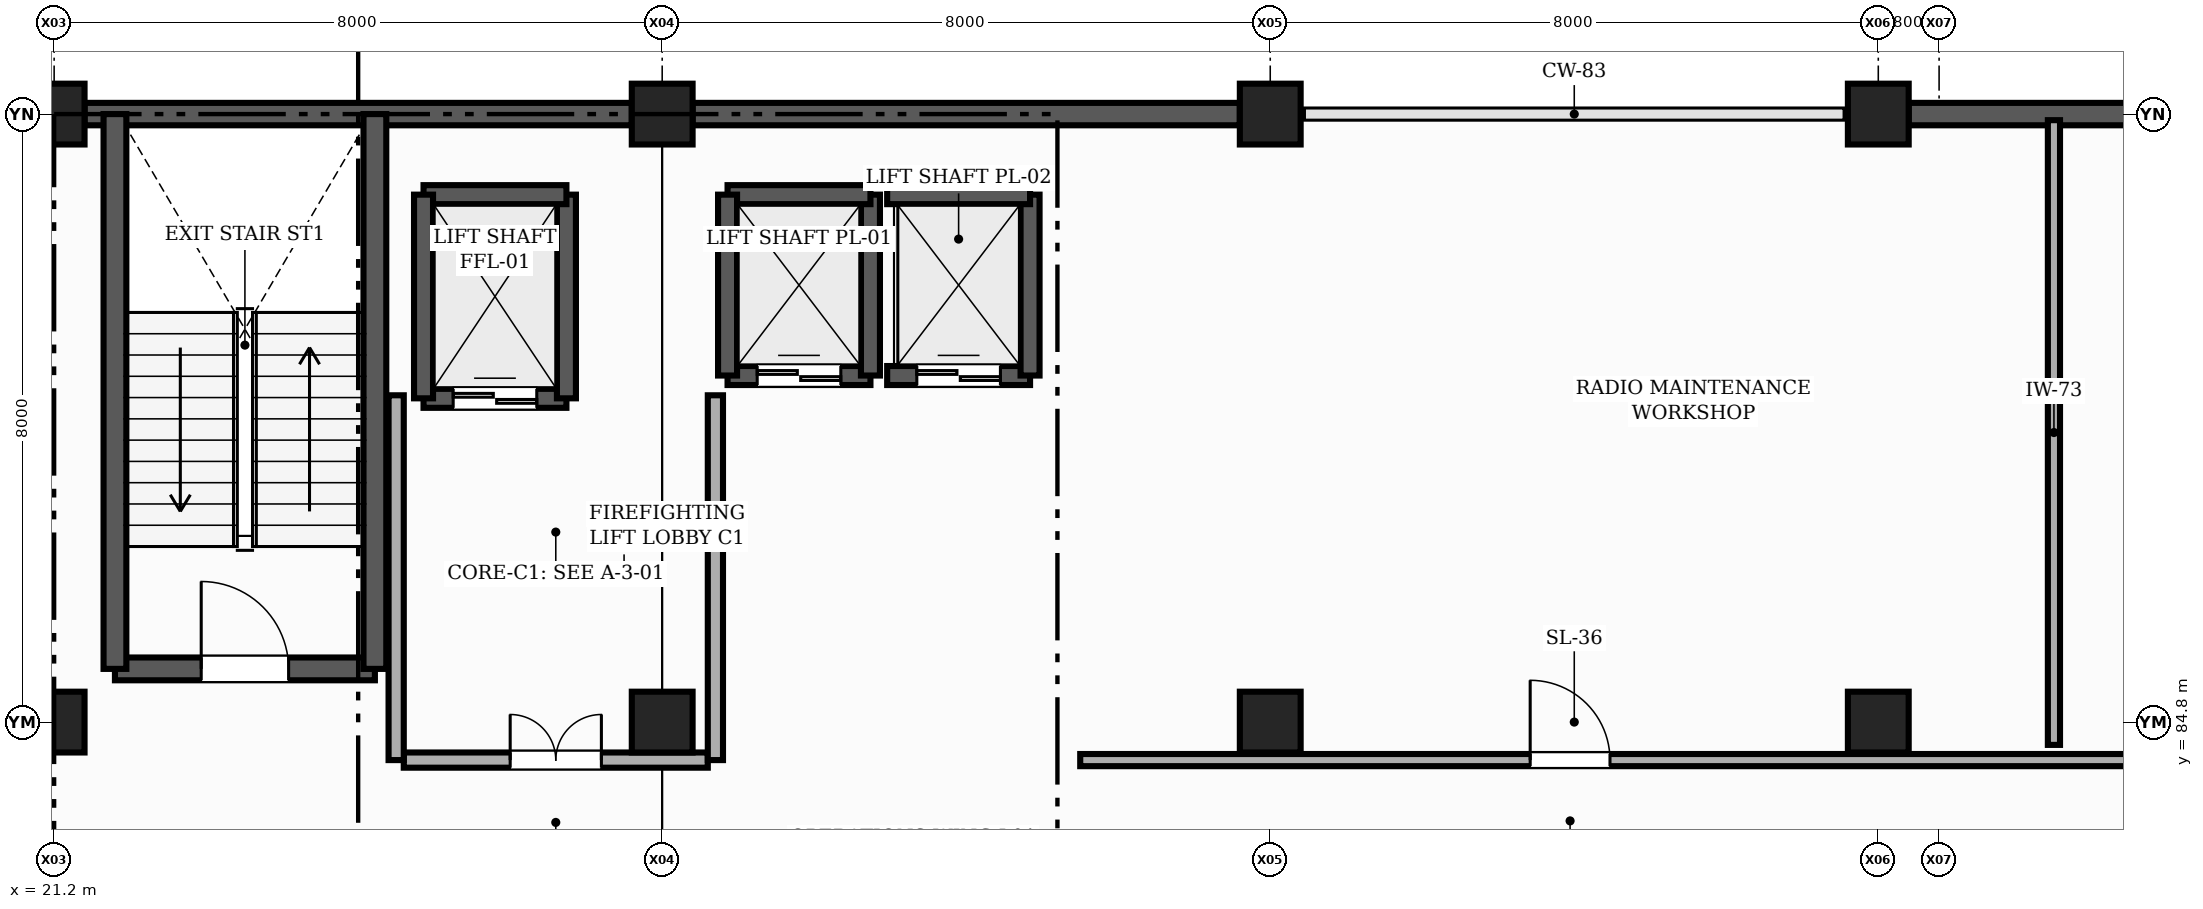
"""IFC4 building model, lengths in metres.
Left out: names, types, materials, properties, quantities, classifications, styles, units other than length and angle.
Written with IfcOpenShell. Run it as: python <this file> out.ifc"""

import sys

from ifc_helpers import new_model, si_unit, direction, frame, frame_2d, origin, origin_2d, place, context, subcontext, project, spatial, rectangle, extrude, element, fill, save


model = new_model("IFC4")
c1 = context("Model", 3, precision=1e-05, world=origin(), true_north=direction((0.0, 1.0)))
c2 = subcontext(c1, "Body", "Model", "MODEL_VIEW")
j1 = project(units=[si_unit("LENGTHUNIT", "METRE"), si_unit("PLANEANGLEUNIT", "RADIAN")], contexts=[c1])
p1 = place(None, origin())
s1 = spatial("IfcSite", under=j1, at=p1, CompositionType="ELEMENT")
p2 = place(p1, origin())
s2 = spatial("IfcBuilding", under=s1, at=p2, CompositionType="ELEMENT")
p3 = place(p2, frame((0.0, 0.0, 4.8)))
s3 = spatial("IfcBuildingStorey", under=s2, at=p3, CompositionType="ELEMENT", Elevation=4.8)
for number, where, z_axis, x_axis in (
    (1, (21.2, 84.8, 0.0), (0.0, 0.0, 1.0), (1.0, 0.0, 0.0)),
    (2, (21.2, 92.8, 0.0), (0.0, 0.0, 1.0), (1.0, 0.0, 0.0)),
    (3, (29.2, 84.8, 0.0), (0.0, 0.0, 1.0), (1.0, 0.0, 0.0)),
    (4, (29.2, 92.8, 0.0), (0.0, 0.0, 1.0), (1.0, 0.0, 0.0)),
    (5, (37.2, 84.8, 0.0), (0.0, 0.0, 1.0), (1.0, 0.0, 0.0)),
    (6, (37.2, 92.8, 0.0), (0.0, 0.0, 1.0), (1.0, 0.0, 0.0)),
    (7, (45.2, 84.8, 0.0), (0.0, 0.0, 1.0), (1.0, 0.0, 0.0)),
    (8, (45.2, 92.8, 0.0), (0.0, 0.0, 1.0), (1.0, 0.0, 0.0)),
):
    element("IfcColumn", number, at=place(p3, frame(where, z_axis=z_axis, x_axis=x_axis)), inside=s3, PredefinedType="COLUMN", context=c2, shape_type="SweptSolid", body=[
        extrude(rectangle(XDim=0.8, YDim=0.8, at=origin_2d()), origin(), (0.0, 0.0, 1.0), 4.2),
    ])
p4 = place(p3, frame((53.6, 92.8, 0.0), z_axis=(0.0, 0.0, 1.0), x_axis=(-1.0, 0.0, 0.0)))
e9 = element("IfcWall", 9, at=p4, inside=s3, PredefinedType="SOLIDWALL", context=c2, shape_type="SweptSolid", body=[
    extrude(rectangle(XDim=8.0, YDim=0.295, at=frame_2d((4.0, 0.0))), origin(), (0.0, 0.0, 1.0), 3.16),
])
p5 = place(p4, frame((3.3, 0.0, 0.9)))
e10 = element("IfcOpeningElement", 10, at=p5, cuts=e9, PredefinedType="OPENING", context=c2, shape_type="SweptSolid", body=[
    extrude(rectangle(XDim=1.4, YDim=1.4, at=frame_2d((0.7, 0.7))), frame((0.0, 0.157, 0.0), z_axis=(0.0, -1.0, 0.0), x_axis=(1.0, 0.0, 0.0)), (0.0, 0.0, 1.0), 0.315),
])
p6 = place(p3, frame((36.8, 92.8, 0.0), z_axis=(0.0, 0.0, 1.0), x_axis=(-1.0, 0.0, 0.0)))
e11 = element("IfcWall", 11, at=p6, inside=s3, PredefinedType="SOLIDWALL", context=c2, shape_type="SweptSolid", body=[
    extrude(rectangle(XDim=7.2, YDim=0.295, at=frame_2d((3.6, 0.0))), origin(), (0.0, 0.0, 1.0), 3.16),
])
p7 = place(p3, frame((28.8, 92.8, 0.0), z_axis=(0.0, 0.0, 1.0), x_axis=(-1.0, 0.0, 0.0)))
e12 = element("IfcWall", 12, at=p7, inside=s3, PredefinedType="SOLIDWALL", context=c2, shape_type="SweptSolid", body=[
    extrude(rectangle(XDim=7.2, YDim=0.295, at=frame_2d((3.6, 0.0))), origin(), (0.0, 0.0, 1.0), 3.91),
])
p8 = place(p3, frame((22.0, 85.5, 0.0), z_axis=(0.0, 0.0, 1.0), x_axis=(1.0, 0.0, 0.0)))
e13 = element("IfcWall", 13, at=p8, inside=s3, PredefinedType="SHEAR", context=c2, shape_type="SweptSolid", body=[
    extrude(rectangle(XDim=3.42, YDim=0.3, at=frame_2d((1.71, 0.0))), origin(), (0.0, 0.0, 1.0), 4.2),
])
p9 = place(p8, frame((1.135, 0.0, 0.0)))
e14 = element("IfcOpeningElement", 14, at=p9, cuts=e13, PredefinedType="OPENING", context=c2, shape_type="SweptSolid", body=[
    extrude(rectangle(XDim=1.15, YDim=2.15, at=frame_2d((0.575, 1.075))), frame((0.0, 0.16, 0.0), z_axis=(0.0, -1.0, 0.0), x_axis=(1.0, 0.0, 0.0)), (0.0, 0.0, 1.0), 0.32),
])
for number, where, z_axis, x_axis in (
    (15, (25.42, 85.5, 0.0), (0.0, 0.0, 1.0), (0.0, 1.0, 0.0)),
    (16, (22.0, 92.8, 0.0), (0.0, 0.0, 1.0), (0.0, -1.0, 0.0)),
):
    element("IfcWall", number, at=place(p3, frame(where, z_axis=z_axis, x_axis=x_axis)), inside=s3, PredefinedType="SHEAR", context=c2, shape_type="SweptSolid", body=[
        extrude(rectangle(XDim=7.3, YDim=0.3, at=frame_2d((3.65, 0.0))), origin(), (0.0, 0.0, 1.0), 4.2),
    ])
p10 = place(p3, frame((26.06, 89.06, 0.0), z_axis=(0.0, 0.0, 1.0), x_axis=(1.0, 0.0, 0.0)))
e17 = element("IfcWall", 17, at=p10, inside=s3, PredefinedType="SHEAR", context=c2, shape_type="SweptSolid", body=[
    extrude(rectangle(XDim=1.88, YDim=0.25, at=frame_2d((0.94, 0.0))), origin(), (0.0, 0.0, 1.0), 4.2),
])
p11 = place(p10, frame((0.39, 0.0, 0.0)))
e18 = element("IfcOpeningElement", 18, at=p11, cuts=e17, PredefinedType="OPENING", context=c2, shape_type="SweptSolid", body=[
    extrude(rectangle(XDim=1.1, YDim=2.2, at=frame_2d((0.55, 1.1))), frame((0.0, 0.135, 0.0), z_axis=(0.0, -1.0, 0.0), x_axis=(1.0, 0.0, 0.0)), (0.0, 0.0, 1.0), 0.27),
])
p12 = place(p3, frame((27.94, 89.06, 0.0), z_axis=(0.0, 0.0, 1.0), x_axis=(0.0, 1.0, 0.0)))
e19 = element("IfcWall", 19, at=p12, inside=s3, PredefinedType="SHEAR", context=c2, shape_type="SweptSolid", body=[
    extrude(rectangle(XDim=2.68, YDim=0.25, at=frame_2d((1.34, 0.0))), origin(), (0.0, 0.0, 1.0), 4.2),
])
p13 = place(p3, frame((27.94, 91.74, 0.0), z_axis=(0.0, 0.0, 1.0), x_axis=(-1.0, 0.0, 0.0)))
e20 = element("IfcWall", 20, at=p13, inside=s3, PredefinedType="SHEAR", context=c2, shape_type="SweptSolid", body=[
    extrude(rectangle(XDim=1.88, YDim=0.25, at=frame_2d((0.94, 0.0))), origin(), (0.0, 0.0, 1.0), 4.2),
])
p14 = place(p3, frame((26.06, 91.74, 0.0), z_axis=(0.0, 0.0, 1.0), x_axis=(0.0, -1.0, 0.0)))
e21 = element("IfcWall", 21, at=p14, inside=s3, PredefinedType="SHEAR", context=c2, shape_type="SweptSolid", body=[
    extrude(rectangle(XDim=2.68, YDim=0.25, at=frame_2d((1.34, 0.0))), origin(), (0.0, 0.0, 1.0), 4.2),
])
p15 = place(p3, frame((30.06, 89.36, 0.0), z_axis=(0.0, 0.0, 1.0), x_axis=(1.0, 0.0, 0.0)))
e22 = element("IfcWall", 22, at=p15, inside=s3, PredefinedType="SHEAR", context=c2, shape_type="SweptSolid", body=[
    extrude(rectangle(XDim=1.88, YDim=0.25, at=frame_2d((0.94, 0.0))), origin(), (0.0, 0.0, 1.0), 4.2),
])
p16 = place(p15, frame((0.39, 0.0, 0.0)))
e23 = element("IfcOpeningElement", 23, at=p16, cuts=e22, PredefinedType="OPENING", context=c2, shape_type="SweptSolid", body=[
    extrude(rectangle(XDim=1.1, YDim=2.2, at=frame_2d((0.55, 1.1))), frame((0.0, 0.135, 0.0), z_axis=(0.0, -1.0, 0.0), x_axis=(1.0, 0.0, 0.0)), (0.0, 0.0, 1.0), 0.27),
])
p17 = place(p3, frame((31.94, 89.36, 0.0), z_axis=(0.0, 0.0, 1.0), x_axis=(0.0, 1.0, 0.0)))
e24 = element("IfcWall", 24, at=p17, inside=s3, PredefinedType="SHEAR", context=c2, shape_type="SweptSolid", body=[
    extrude(rectangle(XDim=2.38, YDim=0.25, at=frame_2d((1.19, 0.0))), origin(), (0.0, 0.0, 1.0), 4.2),
])
p18 = place(p3, frame((31.94, 91.74, 0.0), z_axis=(0.0, 0.0, 1.0), x_axis=(-1.0, 0.0, 0.0)))
e25 = element("IfcWall", 25, at=p18, inside=s3, PredefinedType="SHEAR", context=c2, shape_type="SweptSolid", body=[
    extrude(rectangle(XDim=1.88, YDim=0.25, at=frame_2d((0.94, 0.0))), origin(), (0.0, 0.0, 1.0), 4.2),
])
p19 = place(p3, frame((30.06, 91.74, 0.0), z_axis=(0.0, 0.0, 1.0), x_axis=(0.0, -1.0, 0.0)))
e26 = element("IfcWall", 26, at=p19, inside=s3, PredefinedType="SHEAR", context=c2, shape_type="SweptSolid", body=[
    extrude(rectangle(XDim=2.38, YDim=0.25, at=frame_2d((1.19, 0.0))), origin(), (0.0, 0.0, 1.0), 4.2),
])
p20 = place(p3, frame((32.16, 89.36, 0.0), z_axis=(0.0, 0.0, 1.0), x_axis=(1.0, 0.0, 0.0)))
e27 = element("IfcWall", 27, at=p20, inside=s3, PredefinedType="SHEAR", context=c2, shape_type="SweptSolid", body=[
    extrude(rectangle(XDim=1.88, YDim=0.25, at=frame_2d((0.94, 0.0))), origin(), (0.0, 0.0, 1.0), 4.2),
])
p21 = place(p20, frame((0.39, 0.0, 0.0)))
e28 = element("IfcOpeningElement", 28, at=p21, cuts=e27, PredefinedType="OPENING", context=c2, shape_type="SweptSolid", body=[
    extrude(rectangle(XDim=1.1, YDim=2.2, at=frame_2d((0.55, 1.1))), frame((0.0, 0.135, 0.0), z_axis=(0.0, -1.0, 0.0), x_axis=(1.0, 0.0, 0.0)), (0.0, 0.0, 1.0), 0.27),
])
p22 = place(p3, frame((34.04, 89.36, 0.0), z_axis=(0.0, 0.0, 1.0), x_axis=(0.0, 1.0, 0.0)))
e29 = element("IfcWall", 29, at=p22, inside=s3, PredefinedType="SHEAR", context=c2, shape_type="SweptSolid", body=[
    extrude(rectangle(XDim=2.38, YDim=0.25, at=frame_2d((1.19, 0.0))), origin(), (0.0, 0.0, 1.0), 4.2),
])
p23 = place(p3, frame((34.04, 91.74, 0.0), z_axis=(0.0, 0.0, 1.0), x_axis=(-1.0, 0.0, 0.0)))
e30 = element("IfcWall", 30, at=p23, inside=s3, PredefinedType="SHEAR", context=c2, shape_type="SweptSolid", body=[
    extrude(rectangle(XDim=1.88, YDim=0.25, at=frame_2d((0.94, 0.0))), origin(), (0.0, 0.0, 1.0), 4.2),
])
p24 = place(p3, frame((25.8, 84.3, 0.0), z_axis=(0.0, 0.0, 1.0), x_axis=(1.0, 0.0, 0.0)))
e31 = element("IfcWall", 31, at=p24, inside=s3, PredefinedType="PARTITIONING", context=c2, shape_type="SweptSolid", body=[
    extrude(rectangle(XDim=4.0, YDim=0.2, at=frame_2d((2.0, 0.0))), origin(), (0.0, 0.0, 1.0), 3.195),
])
p25 = place(p24, frame((1.4, 0.0, 0.0)))
e32 = element("IfcOpeningElement", 32, at=p25, cuts=e31, PredefinedType="OPENING", context=c2, shape_type="SweptSolid", body=[
    extrude(rectangle(XDim=1.2, YDim=2.15, at=frame_2d((0.6, 1.075))), frame((0.0, 0.11, 0.0), z_axis=(0.0, -1.0, 0.0), x_axis=(1.0, 0.0, 0.0)), (0.0, 0.0, 1.0), 0.22),
])
p26 = place(p3, frame((25.7, 84.3, 0.0), z_axis=(0.0, 0.0, 1.0), x_axis=(0.0, 1.0, 0.0)))
e33 = element("IfcWall", 33, at=p26, inside=s3, PredefinedType="PARTITIONING", context=c2, shape_type="SweptSolid", body=[
    extrude(rectangle(XDim=4.8, YDim=0.2, at=frame_2d((2.4, 0.0))), origin(), (0.0, 0.0, 1.0), 3.345),
])
p27 = place(p3, frame((29.9, 84.3, 0.0), z_axis=(0.0, 0.0, 1.0), x_axis=(0.0, 1.0, 0.0)))
e34 = element("IfcWall", 34, at=p27, inside=s3, PredefinedType="PARTITIONING", context=c2, shape_type="SweptSolid", body=[
    extrude(rectangle(XDim=4.8, YDim=0.2, at=frame_2d((2.4, 0.0))), origin(), (0.0, 0.0, 1.0), 3.045),
])
p28 = place(p3, frame((47.511, 84.5, 0.0), z_axis=(0.0, 0.0, 1.0), x_axis=(0.0, 1.0, 0.0)))
e35 = element("IfcWall", 35, at=p28, inside=s3, PredefinedType="PARTITIONING", context=c2, shape_type="SweptSolid", body=[
    extrude(rectangle(XDim=8.22, YDim=0.16, at=frame_2d((4.11, 0.0))), origin(), (0.0, 0.0, 1.0), 3.145),
])
p29 = place(p3, frame((34.7, 84.3, 0.0), z_axis=(0.0, 0.0, 1.0), x_axis=(1.0, 0.0, 0.0)))
e36 = element("IfcWall", 36, at=p29, inside=s3, PredefinedType="PARTITIONING", context=c2, shape_type="SweptSolid", body=[
    extrude(rectangle(XDim=35.4, YDim=0.16, at=frame_2d((17.7, 0.0))), origin(), (0.0, 0.0, 1.0), 3.195),
])
p30 = place(p29, frame((5.92, 0.0, 0.0)))
e37 = element("IfcOpeningElement", 37, at=p30, cuts=e36, PredefinedType="OPENING", context=c2, shape_type="SweptSolid", body=[
    extrude(rectangle(XDim=1.05, YDim=2.1, at=frame_2d((0.525, 1.05))), frame((0.0, 0.09, 0.0), z_axis=(0.0, -1.0, 0.0), x_axis=(1.0, 0.0, 0.0)), (0.0, 0.0, 1.0), 0.18),
])
p31 = place(p29, frame((17.2, 0.0, 0.0)))
e38 = element("IfcOpeningElement", 38, at=p31, cuts=e36, PredefinedType="OPENING", context=c2, shape_type="SweptSolid", body=[
    extrude(rectangle(XDim=0.95, YDim=2.15, at=frame_2d((0.475, 1.075))), frame((0.0, 0.09, 0.0), z_axis=(0.0, -1.0, 0.0), x_axis=(1.0, 0.0, 0.0)), (0.0, 0.0, 1.0), 0.18),
])
p32 = place(p29, frame((28.48, 0.0, 0.0)))
e39 = element("IfcOpeningElement", 39, at=p32, cuts=e36, PredefinedType="OPENING", context=c2, shape_type="SweptSolid", body=[
    extrude(rectangle(XDim=1.1, YDim=2.1, at=frame_2d((0.55, 1.05))), frame((0.0, 0.09, 0.0), z_axis=(0.0, -1.0, 0.0), x_axis=(1.0, 0.0, 0.0)), (0.0, 0.0, 1.0), 0.18),
])
p33 = place(p9, origin())
e40 = element("IfcDoor", 40, at=p33, inside=s3, OperationType="SINGLE_SWING_LEFT", PredefinedType="DOOR", context=c2, shape_type="SweptSolid", body=[
    extrude(rectangle(XDim=1.15, YDim=2.15, at=frame_2d((0.575, 1.075))), frame((0.0, 0.025, 0.0), z_axis=(0.0, -1.0, 0.0), x_axis=(1.0, 0.0, 0.0)), (0.0, 0.0, 1.0), 0.05),
])
fill(e14, e40)
p34 = place(p11, origin())
e41 = element("IfcDoor", 41, at=p34, inside=s3, OperationType="DOUBLE_DOOR_SLIDING", PredefinedType="DOOR", context=c2, shape_type="SweptSolid", body=[
    extrude(rectangle(XDim=1.1, YDim=2.2, at=frame_2d((0.55, 1.1))), frame((0.0, 0.025, 0.0), z_axis=(0.0, -1.0, 0.0), x_axis=(1.0, 0.0, 0.0)), (0.0, 0.0, 1.0), 0.05),
])
fill(e18, e41)
p35 = place(p16, origin())
e42 = element("IfcDoor", 42, at=p35, inside=s3, OperationType="DOUBLE_DOOR_SLIDING", PredefinedType="DOOR", context=c2, shape_type="SweptSolid", body=[
    extrude(rectangle(XDim=1.1, YDim=2.2, at=frame_2d((0.55, 1.1))), frame((0.0, 0.025, 0.0), z_axis=(0.0, -1.0, 0.0), x_axis=(1.0, 0.0, 0.0)), (0.0, 0.0, 1.0), 0.05),
])
fill(e23, e42)
p36 = place(p21, origin())
e43 = element("IfcDoor", 43, at=p36, inside=s3, OperationType="DOUBLE_DOOR_SLIDING", PredefinedType="DOOR", context=c2, shape_type="SweptSolid", body=[
    extrude(rectangle(XDim=1.1, YDim=2.2, at=frame_2d((0.55, 1.1))), frame((0.0, 0.025, 0.0), z_axis=(0.0, -1.0, 0.0), x_axis=(1.0, 0.0, 0.0)), (0.0, 0.0, 1.0), 0.05),
])
fill(e28, e43)
p37 = place(p25, origin())
e44 = element("IfcDoor", 44, at=p37, inside=s3, OperationType="DOUBLE_DOOR_SINGLE_SWING", PredefinedType="DOOR", context=c2, shape_type="SweptSolid", body=[
    extrude(rectangle(XDim=1.2, YDim=2.15, at=frame_2d((0.6, 1.075))), frame((0.0, 0.025, 0.0), z_axis=(0.0, -1.0, 0.0), x_axis=(1.0, 0.0, 0.0)), (0.0, 0.0, 1.0), 0.05),
])
fill(e32, e44)
p38 = place(p30, origin())
e45 = element("IfcDoor", 45, at=p38, inside=s3, OperationType="SINGLE_SWING_LEFT", PredefinedType="DOOR", context=c2, shape_type="SweptSolid", body=[
    extrude(rectangle(XDim=1.05, YDim=2.1, at=frame_2d((0.525, 1.05))), frame((0.0, 0.025, 0.0), z_axis=(0.0, -1.0, 0.0), x_axis=(1.0, 0.0, 0.0)), (0.0, 0.0, 1.0), 0.05),
])
fill(e37, e45)
save(model, sys.argv[1])
